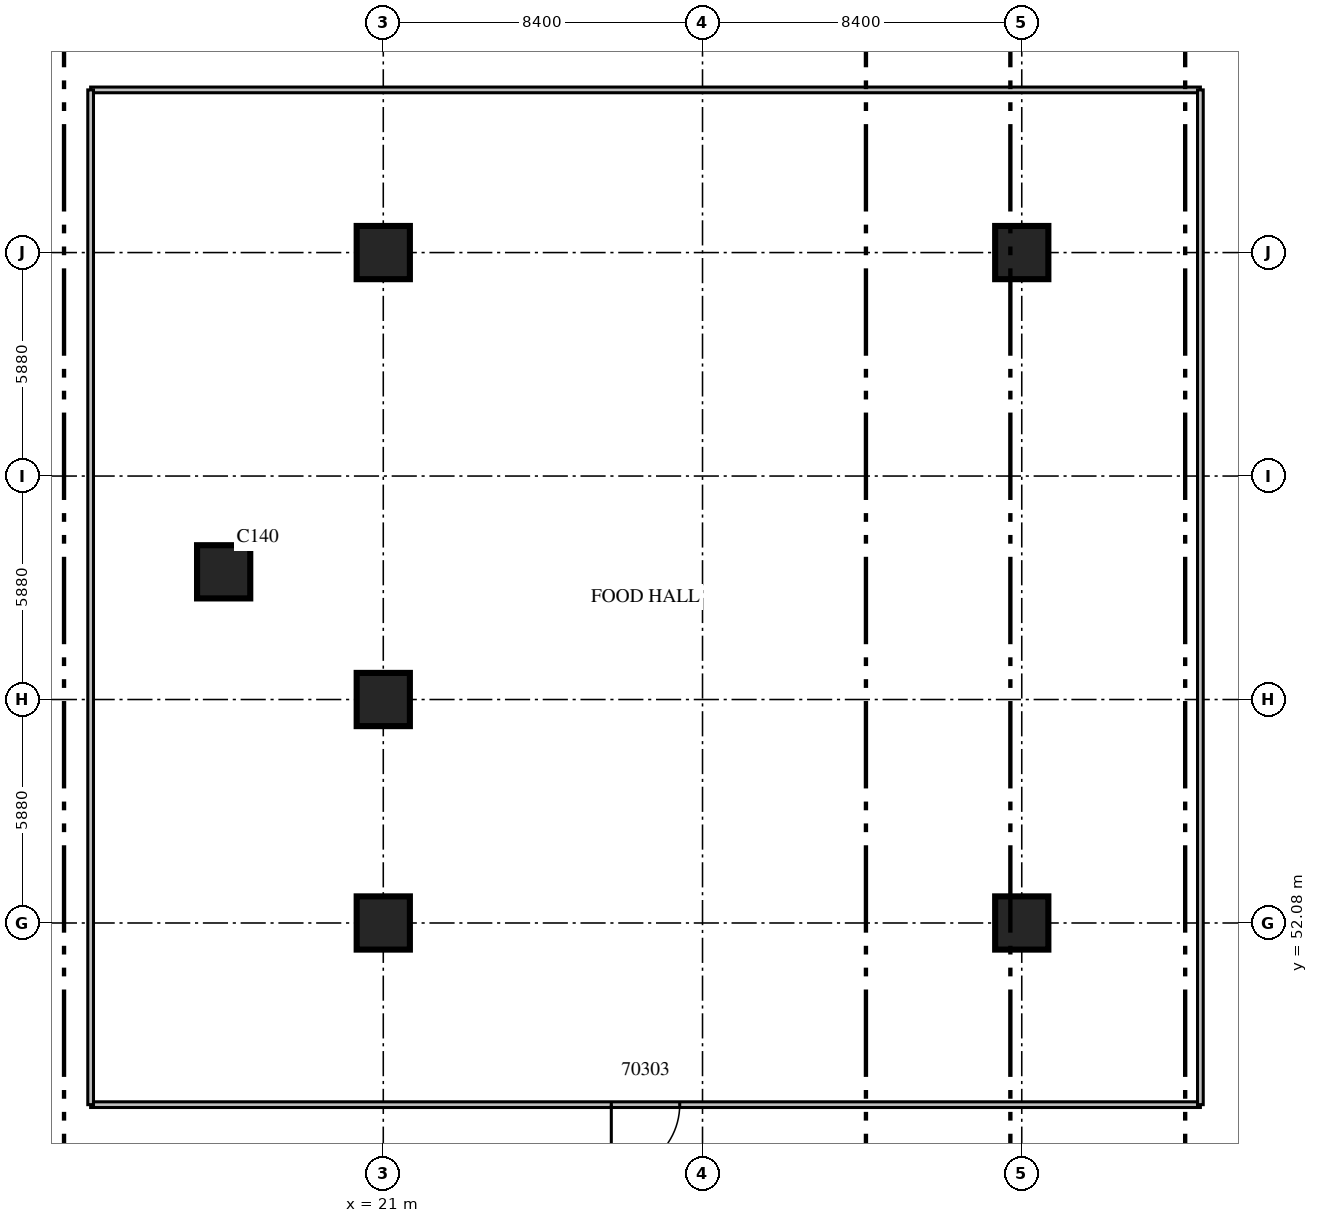
"""IFC4 building model, lengths in metres.
Left out: names, types, materials, properties, quantities, classifications, styles, units other than length and angle.
Written with IfcOpenShell. Run it as: python <this file> out.ifc"""

import sys

from ifc_helpers import new_model, si_unit, direction, frame, frame_2d, origin, origin_2d, place, context, subcontext, project, spatial, rectangle, extrude, source, transform, mapped, element, fill, save


model = new_model("IFC4")
c1 = context("Model", 3, precision=1e-05, world=origin(), true_north=direction((0.0, 1.0)))
c2 = subcontext(c1, "Body", "Model", "MODEL_VIEW")
j1 = project(units=[si_unit("LENGTHUNIT", "METRE"), si_unit("PLANEANGLEUNIT", "RADIAN")], contexts=[c1])
p1 = place(None, origin())
s1 = spatial("IfcSite", under=j1, at=p1, CompositionType="ELEMENT")
p2 = place(p1, origin())
s2 = spatial("IfcBuilding", under=s1, at=p2, CompositionType="ELEMENT")
p3 = place(p2, origin())
s3 = spatial("IfcBuildingStorey", under=s2, at=p3, CompositionType="ELEMENT", Elevation=0.0)
m1 = source(origin(), c2, "Body", "SweptSolid", [
    extrude(rectangle(XDim=1.4, YDim=1.4, at=origin_2d()), origin(), (0.0, 0.0, 1.0), 7.5),
])
for number, where, z_axis, x_axis in (
    (1, (16.8, 61.32, 0.0), (0.0, 0.0, 1.0), (1.0, 0.0, 0.0)),
    (2, (21.0, 52.08, 0.0), (0.0, 0.0, 1.0), (1.0, 0.0, 0.0)),
    (3, (21.0, 57.96, 0.0), (0.0, 0.0, 1.0), (1.0, 0.0, 0.0)),
    (4, (21.0, 69.72, 0.0), (0.0, 0.0, 1.0), (1.0, 0.0, 0.0)),
    (5, (37.8, 52.08, 0.0), (0.0, 0.0, 1.0), (1.0, 0.0, 0.0)),
    (6, (37.8, 69.72, 0.0), (0.0, 0.0, 1.0), (1.0, 0.0, 0.0)),
):
    element("IfcColumn", number, at=place(p3, frame(where, z_axis=z_axis, x_axis=x_axis)), inside=s3, PredefinedType="COLUMN", context=c2, shape_type="MappedRepresentation", body=[
        mapped(m1, transform((0.0, 0.0, 0.0), scale=1.0)),
    ])
m2 = source(origin(), c2, "Body", "SweptSolid", [
    extrude(rectangle(XDim=29.2, YDim=0.15, at=frame_2d((14.6, 0.0))), origin(), (0.0, 0.0, 1.0), 6.9),
])
p4 = place(p3, frame((13.3, 47.3, 0.0), z_axis=(0.0, 0.0, 1.0), x_axis=(1.0, 0.0, 0.0)))
e7 = element("IfcWall", 7, at=p4, inside=s3, PredefinedType="PARTITIONING", context=c2, shape_type="MappedRepresentation", body=[
    mapped(m2, transform((0.0, 0.0, 0.0), scale=1.0)),
])
m3 = source(origin(), c2, "Body", "SweptSolid", [
    extrude(rectangle(XDim=1.8, YDim=2.1, at=frame_2d((0.9, 1.05))), frame((0.0, 0.085, 0.0), z_axis=(0.0, -1.0, 0.0), x_axis=(1.0, 0.0, 0.0)), (0.0, 0.0, 1.0), 0.17),
])
p5 = place(p4, frame((13.7, 0.0, 0.0)))
e8 = element("IfcOpeningElement", 8, at=p5, cuts=e7, PredefinedType="OPENING", context=c2, shape_type="MappedRepresentation", body=[
    mapped(m3, transform((0.0, 0.0, 0.0), scale=1.0)),
])
p6 = place(p3, frame((13.3, 74.0, 0.0), z_axis=(0.0, 0.0, 1.0), x_axis=(1.0, 0.0, 0.0)))
e9 = element("IfcWall", 9, at=p6, inside=s3, PredefinedType="PARTITIONING", context=c2, shape_type="MappedRepresentation", body=[
    mapped(m2, transform((0.0, 0.0, 0.0), scale=1.0)),
])
m4 = source(origin(), c2, "Body", "SweptSolid", [
    extrude(rectangle(XDim=26.7, YDim=0.15, at=frame_2d((13.35, 0.0))), origin(), (0.0, 0.0, 1.0), 6.9),
])
for number, where, z_axis, x_axis in (
    (10, (13.3, 47.3, 0.0), (0.0, 0.0, 1.0), (0.0, 1.0, 0.0)),
    (11, (42.5, 47.3, 0.0), (0.0, 0.0, 1.0), (0.0, 1.0, 0.0)),
):
    element("IfcWall", number, at=place(p3, frame(where, z_axis=z_axis, x_axis=x_axis)), inside=s3, PredefinedType="PARTITIONING", context=c2, shape_type="MappedRepresentation", body=[
        mapped(m4, transform((0.0, 0.0, 0.0), scale=1.0)),
    ])
m5 = source(origin(), c2, "Body", "SweptSolid", [
    extrude(rectangle(XDim=1.8, YDim=2.1, at=frame_2d((0.9, 1.05))), frame((0.0, 0.025, 0.0), z_axis=(0.0, -1.0, 0.0), x_axis=(1.0, 0.0, 0.0)), (0.0, 0.0, 1.0), 0.05),
])
p7 = place(p5, origin())
e12 = element("IfcDoor", 12, at=p7, inside=s3, OperationType="DOUBLE_DOOR_SINGLE_SWING", PredefinedType="DOOR", context=c2, shape_type="MappedRepresentation", body=[
    mapped(m5, transform((0.0, 0.0, 0.0), scale=1.0)),
])
fill(e8, e12)
save(model, sys.argv[1])
